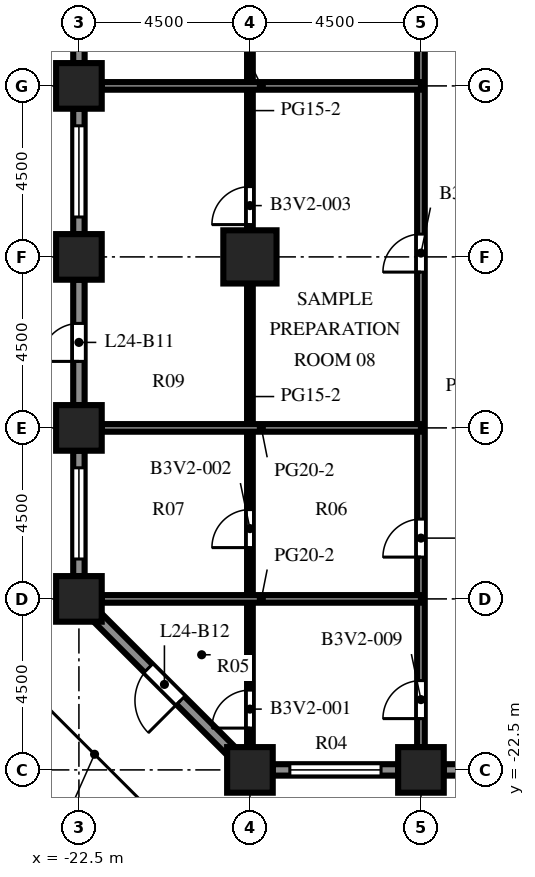
"""IFC4 building model, lengths in metres.
Left out: names, types, materials, properties, quantities, classifications, styles, units other than length and angle.
Written with IfcOpenShell. Run it as: python <this file> out.ifc"""

import sys

from ifc_helpers import new_model, si_unit, direction, frame, frame_2d, origin, origin_2d, place, context, subcontext, project, spatial, rectangle, extrude, element, fill, save


model = new_model("IFC4")
c1 = context("Model", 3, precision=1e-05, world=origin(), true_north=direction((0.0, 1.0)))
c2 = subcontext(c1, "Body", "Model", "MODEL_VIEW")
j1 = project(units=[si_unit("LENGTHUNIT", "METRE"), si_unit("PLANEANGLEUNIT", "RADIAN")], contexts=[c1])
p1 = place(None, origin())
s1 = spatial("IfcSite", under=j1, at=p1, CompositionType="ELEMENT")
p2 = place(p1, origin())
s2 = spatial("IfcBuilding", under=s1, at=p2, CompositionType="ELEMENT")
p3 = place(p2, frame((0.0, 0.0, 106.6)))
s3 = spatial("IfcBuildingStorey", under=s2, at=p3, CompositionType="ELEMENT", Elevation=106.6)
for number, where, z_axis, x_axis in (
    (1, (-22.5, -18.0, 0.0), (0.0, 0.0, 1.0), (1.0, 0.0, 0.0)),
    (2, (-22.5, -13.5, 0.0), (0.0, 0.0, 1.0), (1.0, 0.0, 0.0)),
    (3, (-22.5, -9.0, 0.0), (0.0, 0.0, 1.0), (1.0, 0.0, 0.0)),
    (4, (-22.5, -4.5, 0.0), (0.0, 0.0, 1.0), (1.0, 0.0, 0.0)),
    (5, (-18.0, -22.5, 0.0), (0.0, 0.0, 1.0), (1.0, 0.0, 0.0)),
    (6, (-13.5, -22.5, 0.0), (0.0, 0.0, 1.0), (1.0, 0.0, 0.0)),
):
    element("IfcColumn", number, at=place(p3, frame(where, z_axis=z_axis, x_axis=x_axis)), inside=s3, PredefinedType="COLUMN", context=c2, shape_type="SweptSolid", body=[
        extrude(rectangle(XDim=1.2, YDim=1.2, at=origin_2d()), origin(), (0.0, 0.0, 1.0), 4.1),
    ])
p4 = place(p3, frame((-18.0, -9.0, 0.0), z_axis=(0.0, 0.0, 1.0), x_axis=(1.0, 0.0, 0.0)))
e7 = element("IfcColumn", 7, at=p4, inside=s3, PredefinedType="COLUMN", context=c2, shape_type="SweptSolid", body=[
    extrude(rectangle(XDim=1.4, YDim=1.4, at=origin_2d()), origin(), (0.0, 0.0, 1.0), 4.1),
])
p5 = place(p3, frame((-14.1, -22.5, 0.0), z_axis=(0.0, 0.0, 1.0), x_axis=(-1.0, 0.0, 0.0)))
e8 = element("IfcWall", 8, at=p5, inside=s3, PredefinedType="SOLIDWALL", context=c2, shape_type="SweptSolid", body=[
    extrude(rectangle(XDim=3.3, YDim=0.3, at=frame_2d((1.65, 0.0))), origin(), (0.0, 0.0, 1.0), 2.6),
])
p6 = place(p5, frame((0.45, 0.0, 0.8)))
e9 = element("IfcOpeningElement", 9, at=p6, cuts=e8, PredefinedType="OPENING", context=c2, shape_type="SweptSolid", body=[
    extrude(rectangle(XDim=2.4, YDim=1.7, at=frame_2d((1.2, 0.85))), frame((0.0, 0.16, 0.0), z_axis=(0.0, -1.0, 0.0), x_axis=(1.0, 0.0, 0.0)), (0.0, 0.0, 1.0), 0.32),
])
p7 = place(p3, frame((-9.6, -22.5, 0.0), z_axis=(0.0, 0.0, 1.0), x_axis=(-1.0, 0.0, 0.0)))
e10 = element("IfcWall", 10, at=p7, inside=s3, PredefinedType="SOLIDWALL", context=c2, shape_type="SweptSolid", body=[
    extrude(rectangle(XDim=3.3, YDim=0.3, at=frame_2d((1.65, 0.0))), origin(), (0.0, 0.0, 1.0), 2.6),
])
p8 = place(p7, frame((1.15, 0.0, 0.0)))
e11 = element("IfcOpeningElement", 11, at=p8, cuts=e10, PredefinedType="OPENING", context=c2, shape_type="SweptSolid", body=[
    extrude(rectangle(XDim=1.0, YDim=2.2, at=frame_2d((0.5, 1.1))), frame((0.0, 0.16, 0.0), z_axis=(0.0, -1.0, 0.0), x_axis=(1.0, 0.0, 0.0)), (0.0, 0.0, 1.0), 0.32),
])
p9 = place(p3, frame((-22.5, -3.9, 0.0), z_axis=(0.0, 0.0, 1.0), x_axis=(0.0, 1.0, 0.0)))
e12 = element("IfcWall", 12, at=p9, inside=s3, PredefinedType="SOLIDWALL", context=c2, shape_type="SweptSolid", body=[
    extrude(rectangle(XDim=3.3, YDim=0.3, at=frame_2d((1.65, 0.0))), origin(), (0.0, 0.0, 1.0), 2.6),
])
p10 = place(p9, frame((0.45, 0.0, 0.8)))
e13 = element("IfcOpeningElement", 13, at=p10, cuts=e12, PredefinedType="OPENING", context=c2, shape_type="SweptSolid", body=[
    extrude(rectangle(XDim=2.4, YDim=1.7, at=frame_2d((1.2, 0.85))), frame((0.0, 0.16, 0.0), z_axis=(0.0, -1.0, 0.0), x_axis=(1.0, 0.0, 0.0)), (0.0, 0.0, 1.0), 0.32),
])
p11 = place(p3, frame((-22.5, -8.4, 0.0), z_axis=(0.0, 0.0, 1.0), x_axis=(0.0, 1.0, 0.0)))
e14 = element("IfcWall", 14, at=p11, inside=s3, PredefinedType="SOLIDWALL", context=c2, shape_type="SweptSolid", body=[
    extrude(rectangle(XDim=3.3, YDim=0.3, at=frame_2d((1.65, 0.0))), origin(), (0.0, 0.0, 1.0), 2.6),
])
p12 = place(p11, frame((0.45, 0.0, 0.8)))
e15 = element("IfcOpeningElement", 15, at=p12, cuts=e14, PredefinedType="OPENING", context=c2, shape_type="SweptSolid", body=[
    extrude(rectangle(XDim=2.4, YDim=1.7, at=frame_2d((1.2, 0.85))), frame((0.0, 0.16, 0.0), z_axis=(0.0, -1.0, 0.0), x_axis=(1.0, 0.0, 0.0)), (0.0, 0.0, 1.0), 0.32),
])
p13 = place(p3, frame((-22.5, -12.9, 0.0), z_axis=(0.0, 0.0, 1.0), x_axis=(0.0, 1.0, 0.0)))
e16 = element("IfcWall", 16, at=p13, inside=s3, PredefinedType="SOLIDWALL", context=c2, shape_type="SweptSolid", body=[
    extrude(rectangle(XDim=3.3, YDim=0.3, at=frame_2d((1.65, 0.0))), origin(), (0.0, 0.0, 1.0), 2.6),
])
p14 = place(p13, frame((1.15, 0.0, 0.0)))
e17 = element("IfcOpeningElement", 17, at=p14, cuts=e16, PredefinedType="OPENING", context=c2, shape_type="SweptSolid", body=[
    extrude(rectangle(XDim=1.0, YDim=2.2, at=frame_2d((0.5, 1.1))), frame((0.0, 0.16, 0.0), z_axis=(0.0, -1.0, 0.0), x_axis=(1.0, 0.0, 0.0)), (0.0, 0.0, 1.0), 0.32),
])
p15 = place(p3, frame((-22.5, -17.4, 0.0), z_axis=(0.0, 0.0, 1.0), x_axis=(0.0, 1.0, 0.0)))
e18 = element("IfcWall", 18, at=p15, inside=s3, PredefinedType="SOLIDWALL", context=c2, shape_type="SweptSolid", body=[
    extrude(rectangle(XDim=3.3, YDim=0.3, at=frame_2d((1.65, 0.0))), origin(), (0.0, 0.0, 1.0), 2.6),
])
p16 = place(p15, frame((0.45, 0.0, 0.8)))
e19 = element("IfcOpeningElement", 19, at=p16, cuts=e18, PredefinedType="OPENING", context=c2, shape_type="SweptSolid", body=[
    extrude(rectangle(XDim=2.4, YDim=1.7, at=frame_2d((1.2, 0.85))), frame((0.0, 0.16, 0.0), z_axis=(0.0, -1.0, 0.0), x_axis=(1.0, 0.0, 0.0)), (0.0, 0.0, 1.0), 0.32),
])
p17 = place(p3, frame((-18.494, -22.006, 0.0), z_axis=(0.0, 0.0, 1.0), x_axis=(-0.707106781187, 0.707106781187, 0.0)))
e20 = element("IfcWall", 20, at=p17, inside=s3, PredefinedType="SOLIDWALL", context=c2, shape_type="SweptSolid", body=[
    extrude(rectangle(XDim=4.967, YDim=0.3, at=frame_2d((2.483, 0.0))), origin(), (0.0, 0.0, 1.0), 2.6),
])
p18 = place(p17, frame((1.884, 0.0, 0.0)))
e21 = element("IfcOpeningElement", 21, at=p18, cuts=e20, PredefinedType="OPENING", context=c2, shape_type="SweptSolid", body=[
    extrude(rectangle(XDim=1.2, YDim=2.2, at=frame_2d((0.6, 1.1))), frame((0.0, 0.16, 0.0), z_axis=(0.0, -1.0, 0.0), x_axis=(1.0, 0.0, 0.0)), (0.0, 0.0, 1.0), 0.32),
])
p19 = place(p3, frame((-18.0, -21.9, 0.0), z_axis=(0.0, 0.0, 1.0), x_axis=(0.0, 1.0, 0.0)))
e22 = element("IfcWall", 22, at=p19, inside=s3, PredefinedType="PARTITIONING", context=c2, shape_type="SweptSolid", body=[
    extrude(rectangle(XDim=12.2, YDim=0.15, at=frame_2d((6.1, 0.0))), origin(), (0.0, 0.0, 1.0), 3.5),
])
p20 = place(p19, frame((0.5, 0.0, 0.0)))
e23 = element("IfcOpeningElement", 23, at=p20, cuts=e22, PredefinedType="OPENING", context=c2, shape_type="SweptSolid", body=[
    extrude(rectangle(XDim=1.0, YDim=2.1, at=frame_2d((0.5, 1.05))), frame((0.0, 0.085, 0.0), z_axis=(0.0, -1.0, 0.0), x_axis=(1.0, 0.0, 0.0)), (0.0, 0.0, 1.0), 0.17),
])
p21 = place(p19, frame((5.25, 0.0, 0.0)))
e24 = element("IfcOpeningElement", 24, at=p21, cuts=e22, PredefinedType="OPENING", context=c2, shape_type="SweptSolid", body=[
    extrude(rectangle(XDim=1.0, YDim=2.1, at=frame_2d((0.5, 1.05))), frame((0.0, 0.085, 0.0), z_axis=(0.0, -1.0, 0.0), x_axis=(1.0, 0.0, 0.0)), (0.0, 0.0, 1.0), 0.17),
])
p22 = place(p3, frame((-18.0, -8.3, 0.0), z_axis=(0.0, 0.0, 1.0), x_axis=(0.0, 1.0, 0.0)))
e25 = element("IfcWall", 25, at=p22, inside=s3, PredefinedType="PARTITIONING", context=c2, shape_type="SweptSolid", body=[
    extrude(rectangle(XDim=7.6, YDim=0.15, at=frame_2d((3.8, 0.0))), origin(), (0.0, 0.0, 1.0), 3.5),
])
p23 = place(p22, frame((0.15, 0.0, 0.0)))
e26 = element("IfcOpeningElement", 26, at=p23, cuts=e25, PredefinedType="OPENING", context=c2, shape_type="SweptSolid", body=[
    extrude(rectangle(XDim=1.0, YDim=2.1, at=frame_2d((0.5, 1.05))), frame((0.0, 0.085, 0.0), z_axis=(0.0, -1.0, 0.0), x_axis=(1.0, 0.0, 0.0)), (0.0, 0.0, 1.0), 0.17),
])
p24 = place(p22, frame((5.15, 0.0, 0.0)))
e27 = element("IfcOpeningElement", 27, at=p24, cuts=e25, PredefinedType="OPENING", context=c2, shape_type="SweptSolid", body=[
    extrude(rectangle(XDim=1.0, YDim=2.1, at=frame_2d((0.5, 1.05))), frame((0.0, 0.085, 0.0), z_axis=(0.0, -1.0, 0.0), x_axis=(1.0, 0.0, 0.0)), (0.0, 0.0, 1.0), 0.17),
])
p25 = place(p3, frame((-13.5, -21.9, 0.0), z_axis=(0.0, 0.0, 1.0), x_axis=(0.0, 1.0, 0.0)))
e28 = element("IfcWall", 28, at=p25, inside=s3, PredefinedType="PARTITIONING", context=c2, shape_type="SweptSolid", body=[
    extrude(rectangle(XDim=52.8, YDim=0.2, at=frame_2d((26.4, 0.0))), origin(), (0.0, 0.0, 1.0), 3.5),
])
p26 = place(p25, frame((0.75, 0.0, 0.0)))
e29 = element("IfcOpeningElement", 29, at=p26, cuts=e28, PredefinedType="OPENING", context=c2, shape_type="SweptSolid", body=[
    extrude(rectangle(XDim=1.0, YDim=2.1, at=frame_2d((0.5, 1.05))), frame((0.0, 0.11, 0.0), z_axis=(0.0, -1.0, 0.0), x_axis=(1.0, 0.0, 0.0)), (0.0, 0.0, 1.0), 0.22),
])
p27 = place(p25, frame((5.0, 0.0, 0.0)))
e30 = element("IfcOpeningElement", 30, at=p27, cuts=e28, PredefinedType="OPENING", context=c2, shape_type="SweptSolid", body=[
    extrude(rectangle(XDim=1.0, YDim=2.1, at=frame_2d((0.5, 1.05))), frame((0.0, 0.11, 0.0), z_axis=(0.0, -1.0, 0.0), x_axis=(1.0, 0.0, 0.0)), (0.0, 0.0, 1.0), 0.22),
])
p28 = place(p25, frame((12.5, 0.0, 0.0)))
e31 = element("IfcOpeningElement", 31, at=p28, cuts=e28, PredefinedType="OPENING", context=c2, shape_type="SweptSolid", body=[
    extrude(rectangle(XDim=1.0, YDim=2.1, at=frame_2d((0.5, 1.05))), frame((0.0, 0.11, 0.0), z_axis=(0.0, -1.0, 0.0), x_axis=(1.0, 0.0, 0.0)), (0.0, 0.0, 1.0), 0.22),
])
p29 = place(p25, frame((19.75, 0.0, 0.0)))
e32 = element("IfcOpeningElement", 32, at=p29, cuts=e28, PredefinedType="OPENING", context=c2, shape_type="SweptSolid", body=[
    extrude(rectangle(XDim=1.0, YDim=2.1, at=frame_2d((0.5, 1.05))), frame((0.0, 0.11, 0.0), z_axis=(0.0, -1.0, 0.0), x_axis=(1.0, 0.0, 0.0)), (0.0, 0.0, 1.0), 0.22),
])
p30 = place(p25, frame((26.0, 0.0, 0.0)))
e33 = element("IfcOpeningElement", 33, at=p30, cuts=e28, PredefinedType="OPENING", context=c2, shape_type="SweptSolid", body=[
    extrude(rectangle(XDim=1.0, YDim=2.1, at=frame_2d((0.5, 1.05))), frame((0.0, 0.11, 0.0), z_axis=(0.0, -1.0, 0.0), x_axis=(1.0, 0.0, 0.0)), (0.0, 0.0, 1.0), 0.22),
])
p31 = place(p25, frame((37.5, 0.0, 0.0)))
e34 = element("IfcOpeningElement", 34, at=p31, cuts=e28, PredefinedType="OPENING", context=c2, shape_type="SweptSolid", body=[
    extrude(rectangle(XDim=1.0, YDim=2.1, at=frame_2d((0.5, 1.05))), frame((0.0, 0.11, 0.0), z_axis=(0.0, -1.0, 0.0), x_axis=(1.0, 0.0, 0.0)), (0.0, 0.0, 1.0), 0.22),
])
p32 = place(p25, frame((43.25, 0.0, 0.0)))
e35 = element("IfcOpeningElement", 35, at=p32, cuts=e28, PredefinedType="OPENING", context=c2, shape_type="SweptSolid", body=[
    extrude(rectangle(XDim=1.0, YDim=2.1, at=frame_2d((0.5, 1.05))), frame((0.0, 0.11, 0.0), z_axis=(0.0, -1.0, 0.0), x_axis=(1.0, 0.0, 0.0)), (0.0, 0.0, 1.0), 0.22),
])
p33 = place(p25, frame((50.0, 0.0, 0.0)))
e36 = element("IfcOpeningElement", 36, at=p33, cuts=e28, PredefinedType="OPENING", context=c2, shape_type="SweptSolid", body=[
    extrude(rectangle(XDim=1.0, YDim=2.1, at=frame_2d((0.5, 1.05))), frame((0.0, 0.11, 0.0), z_axis=(0.0, -1.0, 0.0), x_axis=(1.0, 0.0, 0.0)), (0.0, 0.0, 1.0), 0.22),
])
for number, where, z_axis, x_axis in (
    (37, (-21.9, -18.0, 0.0), (0.0, 0.0, 1.0), (1.0, 0.0, 0.0)),
    (38, (-21.9, -13.5, 0.0), (0.0, 0.0, 1.0), (1.0, 0.0, 0.0)),
    (39, (-21.9, -4.5, 0.0), (0.0, 0.0, 1.0), (1.0, 0.0, 0.0)),
):
    element("IfcWall", number, at=place(p3, frame(where, z_axis=z_axis, x_axis=x_axis)), inside=s3, PredefinedType="PARTITIONING", context=c2, shape_type="SweptSolid", body=[
        extrude(rectangle(XDim=8.4, YDim=0.2, at=frame_2d((4.2, 0.0))), origin(), (0.0, 0.0, 1.0), 3.5),
    ])
p34 = place(p6, origin())
e40 = element("IfcWindow", 40, at=p34, inside=s3, PartitioningType="SINGLE_PANEL", PredefinedType="WINDOW", context=c2, shape_type="SweptSolid", body=[
    extrude(rectangle(XDim=2.4, YDim=1.7, at=frame_2d((1.2, 0.85))), frame((0.0, 0.03, 0.0), z_axis=(0.0, -1.0, 0.0), x_axis=(1.0, 0.0, 0.0)), (0.0, 0.0, 1.0), 0.06),
])
fill(e9, e40)
p35 = place(p12, origin())
e41 = element("IfcWindow", 41, at=p35, inside=s3, PartitioningType="SINGLE_PANEL", PredefinedType="WINDOW", context=c2, shape_type="SweptSolid", body=[
    extrude(rectangle(XDim=2.4, YDim=1.7, at=frame_2d((1.2, 0.85))), frame((0.0, 0.03, 0.0), z_axis=(0.0, -1.0, 0.0), x_axis=(1.0, 0.0, 0.0)), (0.0, 0.0, 1.0), 0.06),
])
fill(e15, e41)
p36 = place(p14, origin())
e42 = element("IfcDoor", 42, at=p36, inside=s3, OperationType="SINGLE_SWING_LEFT", PredefinedType="DOOR", context=c2, shape_type="SweptSolid", body=[
    extrude(rectangle(XDim=1.0, YDim=2.2, at=frame_2d((0.5, 1.1))), frame((0.0, 0.025, 0.0), z_axis=(0.0, -1.0, 0.0), x_axis=(1.0, 0.0, 0.0)), (0.0, 0.0, 1.0), 0.05),
])
fill(e17, e42)
p37 = place(p16, origin())
e43 = element("IfcWindow", 43, at=p37, inside=s3, PartitioningType="SINGLE_PANEL", PredefinedType="WINDOW", context=c2, shape_type="SweptSolid", body=[
    extrude(rectangle(XDim=2.4, YDim=1.7, at=frame_2d((1.2, 0.85))), frame((0.0, 0.03, 0.0), z_axis=(0.0, -1.0, 0.0), x_axis=(1.0, 0.0, 0.0)), (0.0, 0.0, 1.0), 0.06),
])
fill(e19, e43)
p38 = place(p18, origin())
e44 = element("IfcDoor", 44, at=p38, inside=s3, OperationType="SINGLE_SWING_LEFT", PredefinedType="DOOR", context=c2, shape_type="SweptSolid", body=[
    extrude(rectangle(XDim=1.2, YDim=2.2, at=frame_2d((0.6, 1.1))), frame((0.0, 0.025, 0.0), z_axis=(0.0, -1.0, 0.0), x_axis=(1.0, 0.0, 0.0)), (0.0, 0.0, 1.0), 0.05),
])
fill(e21, e44)
p39 = place(p20, origin())
e45 = element("IfcDoor", 45, at=p39, inside=s3, OperationType="SINGLE_SWING_LEFT", PredefinedType="DOOR", context=c2, shape_type="SweptSolid", body=[
    extrude(rectangle(XDim=1.0, YDim=2.1, at=frame_2d((0.5, 1.05))), frame((0.0, 0.025, 0.0), z_axis=(0.0, -1.0, 0.0), x_axis=(1.0, 0.0, 0.0)), (0.0, 0.0, 1.0), 0.05),
])
fill(e23, e45)
p40 = place(p21, origin())
e46 = element("IfcDoor", 46, at=p40, inside=s3, OperationType="SINGLE_SWING_LEFT", PredefinedType="DOOR", context=c2, shape_type="SweptSolid", body=[
    extrude(rectangle(XDim=1.0, YDim=2.1, at=frame_2d((0.5, 1.05))), frame((0.0, 0.025, 0.0), z_axis=(0.0, -1.0, 0.0), x_axis=(1.0, 0.0, 0.0)), (0.0, 0.0, 1.0), 0.05),
])
fill(e24, e46)
p41 = place(p23, origin())
e47 = element("IfcDoor", 47, at=p41, inside=s3, OperationType="SINGLE_SWING_LEFT", PredefinedType="DOOR", context=c2, shape_type="SweptSolid", body=[
    extrude(rectangle(XDim=1.0, YDim=2.1, at=frame_2d((0.5, 1.05))), frame((0.0, 0.025, 0.0), z_axis=(0.0, -1.0, 0.0), x_axis=(1.0, 0.0, 0.0)), (0.0, 0.0, 1.0), 0.05),
])
fill(e26, e47)
p42 = place(p26, origin())
e48 = element("IfcDoor", 48, at=p42, inside=s3, OperationType="SINGLE_SWING_LEFT", PredefinedType="DOOR", context=c2, shape_type="SweptSolid", body=[
    extrude(rectangle(XDim=1.0, YDim=2.1, at=frame_2d((0.5, 1.05))), frame((0.0, 0.025, 0.0), z_axis=(0.0, -1.0, 0.0), x_axis=(1.0, 0.0, 0.0)), (0.0, 0.0, 1.0), 0.05),
])
fill(e29, e48)
p43 = place(p27, origin())
e49 = element("IfcDoor", 49, at=p43, inside=s3, OperationType="SINGLE_SWING_LEFT", PredefinedType="DOOR", context=c2, shape_type="SweptSolid", body=[
    extrude(rectangle(XDim=1.0, YDim=2.1, at=frame_2d((0.5, 1.05))), frame((0.0, 0.025, 0.0), z_axis=(0.0, -1.0, 0.0), x_axis=(1.0, 0.0, 0.0)), (0.0, 0.0, 1.0), 0.05),
])
fill(e30, e49)
p44 = place(p28, origin())
e50 = element("IfcDoor", 50, at=p44, inside=s3, OperationType="SINGLE_SWING_LEFT", PredefinedType="DOOR", context=c2, shape_type="SweptSolid", body=[
    extrude(rectangle(XDim=1.0, YDim=2.1, at=frame_2d((0.5, 1.05))), frame((0.0, 0.025, 0.0), z_axis=(0.0, -1.0, 0.0), x_axis=(1.0, 0.0, 0.0)), (0.0, 0.0, 1.0), 0.05),
])
fill(e31, e50)
save(model, sys.argv[1])
